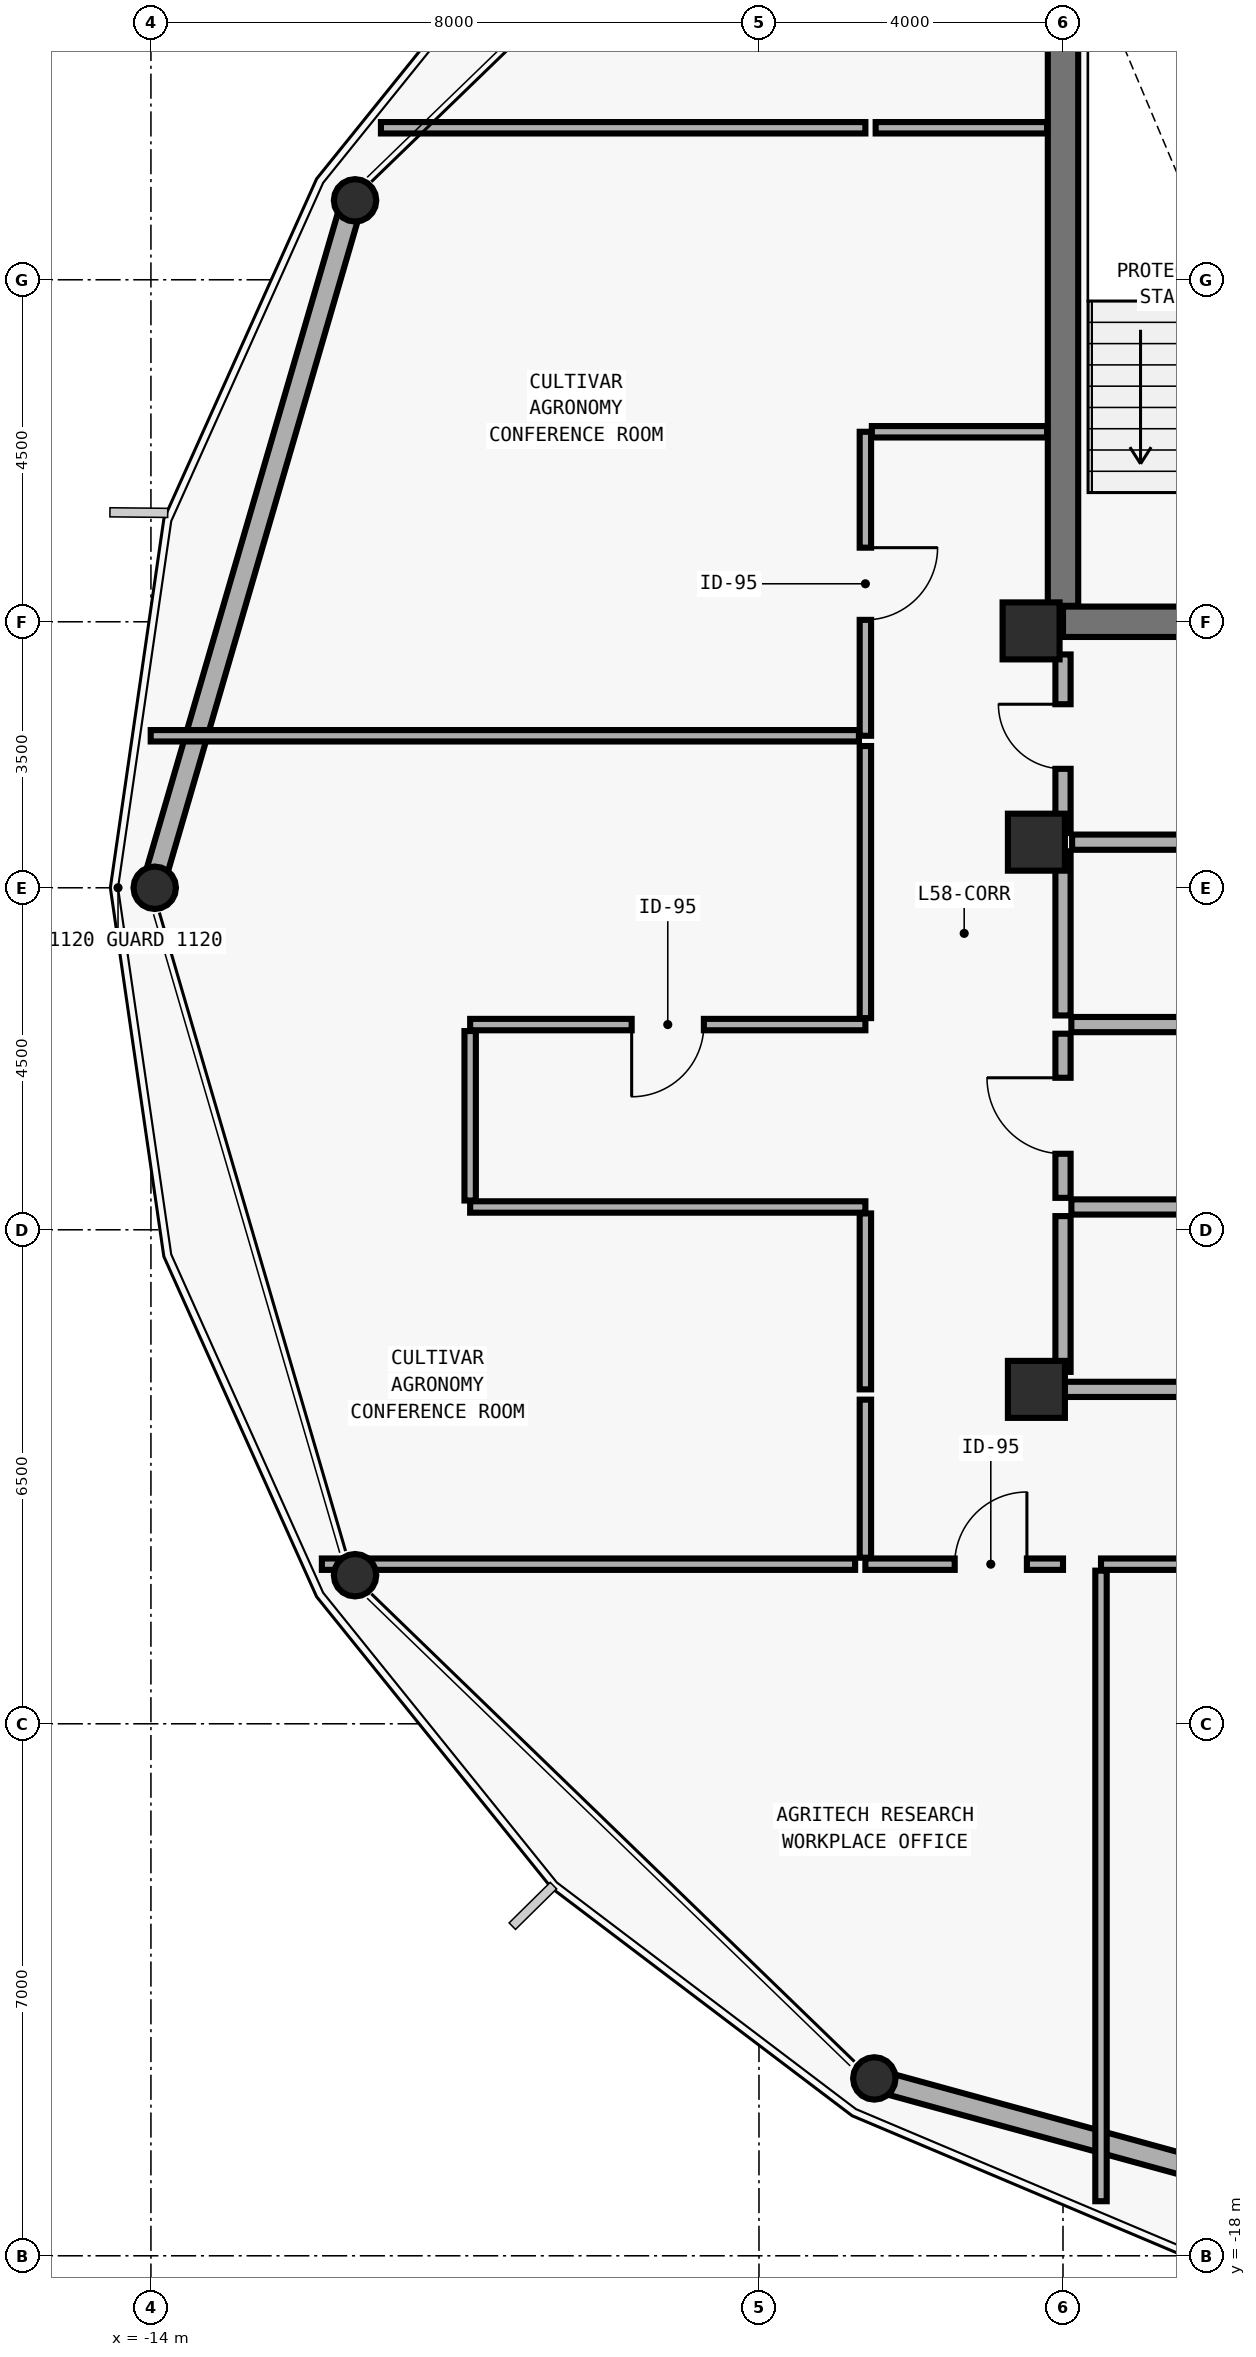
"""IFC4 building model, lengths in metres.
Left out: names, types, materials, properties, quantities, classifications, styles, units other than length and angle.
Written with IfcOpenShell. Run it as: python <this file> out.ifc"""

import sys

from ifc_helpers import new_model, si_unit, direction, frame, frame_2d, origin, origin_2d, place, context, subcontext, project, spatial, rectangle, hollow_circle, extrude, element, fill, save


model = new_model("IFC4")
c1 = context("Model", 3, precision=1e-05, world=origin(), true_north=direction((0.0, 1.0)))
c2 = subcontext(c1, "Body", "Model", "MODEL_VIEW")
j1 = project(units=[si_unit("LENGTHUNIT", "METRE"), si_unit("PLANEANGLEUNIT", "RADIAN")], contexts=[c1])
p1 = place(None, origin())
s1 = spatial("IfcSite", under=j1, at=p1, CompositionType="ELEMENT")
p2 = place(p1, origin())
s2 = spatial("IfcBuilding", under=s1, at=p2, CompositionType="ELEMENT")
p3 = place(p2, frame((0.0, 0.0, 229.2)))
s3 = spatial("IfcBuildingStorey", under=s2, at=p3, CompositionType="ELEMENT", Elevation=229.2)
p4 = place(p3, frame((-2.0, 3.5, 0.0), z_axis=(0.0, 0.0, 1.0), x_axis=(1.0, 0.0, 0.0)))
e1 = element("IfcWall", 1, at=p4, inside=s3, PredefinedType="SHEAR", context=c2, shape_type="SweptSolid", body=[
    extrude(rectangle(XDim=10.0, YDim=0.4, at=frame_2d((5.0, 0.0))), origin(), (0.0, 0.0, 1.0), 3.592),
])
p5 = place(p4, frame((1.65, 0.0, 0.0)))
e2 = element("IfcOpeningElement", 2, at=p5, cuts=e1, PredefinedType="OPENING", context=c2, shape_type="SweptSolid", body=[
    extrude(rectangle(XDim=1.1, YDim=2.15, at=frame_2d((0.55, 1.075))), frame((0.0, 0.21, 0.0), z_axis=(0.0, -1.0, 0.0), x_axis=(1.0, 0.0, 0.0)), (0.0, 0.0, 1.0), 0.42),
])
p6 = place(p4, frame((7.65, 0.0, 0.0)))
e3 = element("IfcOpeningElement", 3, at=p6, cuts=e1, PredefinedType="OPENING", context=c2, shape_type="SweptSolid", body=[
    extrude(rectangle(XDim=1.1, YDim=2.15, at=frame_2d((0.55, 1.075))), frame((0.0, 0.21, 0.0), z_axis=(0.0, -1.0, 0.0), x_axis=(1.0, 0.0, 0.0)), (0.0, 0.0, 1.0), 0.42),
])
p7 = place(p4, frame((3.72, 0.0, 0.0)))
e4 = element("IfcOpeningElement", 4, at=p7, cuts=e1, PredefinedType="OPENING", context=c2, shape_type="SweptSolid", body=[
    extrude(rectangle(XDim=1.1, YDim=2.2, at=frame_2d((0.55, 1.1))), frame((0.0, 0.21, 0.0), z_axis=(0.0, -1.0, 0.0), x_axis=(1.0, 0.0, 0.0)), (0.0, 0.0, 1.0), 0.42),
])
p8 = place(p4, frame((5.18, 0.0, 0.0)))
e5 = element("IfcOpeningElement", 5, at=p8, cuts=e1, PredefinedType="OPENING", context=c2, shape_type="SweptSolid", body=[
    extrude(rectangle(XDim=1.1, YDim=2.2, at=frame_2d((0.55, 1.1))), frame((0.0, 0.21, 0.0), z_axis=(0.0, -1.0, 0.0), x_axis=(1.0, 0.0, 0.0)), (0.0, 0.0, 1.0), 0.42),
])
p9 = place(p3, frame((-2.0, 3.71, 0.0), z_axis=(0.0, 0.0, 1.0), x_axis=(0.0, 1.0, 0.0)))
e6 = element("IfcWall", 6, at=p9, inside=s3, PredefinedType="SHEAR", context=c2, shape_type="SweptSolid", body=[
    extrude(rectangle(XDim=8.58, YDim=0.4, at=frame_2d((4.29, 0.0))), origin(), (0.0, 0.0, 1.0), 3.592),
])
for number, where, z_axis, x_axis in (
    (7, (-2.42, 3.38, 0.0), (0.0, 0.0, 1.0), (1.0, 0.0, 0.0)),
    (8, (-2.35, 0.6, 0.0), (0.0, 0.0, 1.0), (1.0, 0.0, 0.0)),
    (9, (-2.35, -6.6, 0.0), (0.0, 0.0, 1.0), (1.0, 0.0, 0.0)),
):
    element("IfcColumn", number, at=place(p3, frame(where, z_axis=z_axis, x_axis=x_axis)), inside=s3, PredefinedType="COLUMN", context=c2, shape_type="SweptSolid", body=[
        extrude(rectangle(XDim=0.75, YDim=0.75, at=origin_2d()), origin(), (0.0, 0.0, 1.0), 3.575),
    ])
p10 = place(p3, frame((-11.344, 9.053, 0.0), z_axis=(0.016455964715, -0.004711458777, 0.999853490958), x_axis=(0.275247949014, 0.961373271193, 0.0)))
e10 = element("IfcColumn", 10, at=p10, inside=s3, PredefinedType="COLUMN", context=c2, shape_type="SweptSolid", body=[
    extrude(hollow_circle(Radius=0.28, WallThickness=0.02, at=origin_2d()), origin(), (0.0, 0.0, 1.0), 3.575),
])
p11 = place(p3, frame((-13.984, 0.0, 0.0), z_axis=(0.018981760075, 0.0, 0.999819830162), x_axis=(0.0, 1.0, 0.0)))
e11 = element("IfcColumn", 11, at=p11, inside=s3, PredefinedType="COLUMN", context=c2, shape_type="SweptSolid", body=[
    extrude(hollow_circle(Radius=0.28, WallThickness=0.02, at=origin_2d()), origin(), (0.0, 0.0, 1.0), 3.576),
])
p12 = place(p3, frame((-11.344, -9.053, 0.0), z_axis=(0.016455964715, 0.004711458777, 0.999853490958), x_axis=(-0.275247949014, 0.961373271193, 0.0)))
e12 = element("IfcColumn", 12, at=p12, inside=s3, PredefinedType="COLUMN", context=c2, shape_type="SweptSolid", body=[
    extrude(hollow_circle(Radius=0.28, WallThickness=0.02, at=origin_2d()), origin(), (0.0, 0.0, 1.0), 3.575),
])
p13 = place(p3, frame((-4.5, -15.681, 0.0), z_axis=(0.00949183863, 0.008262679671, 0.999920813427), x_axis=(-0.656581650754, 0.754254954172, 0.0)))
e13 = element("IfcColumn", 13, at=p13, inside=s3, PredefinedType="COLUMN", context=c2, shape_type="SweptSolid", body=[
    extrude(hollow_circle(Radius=0.28, WallThickness=0.02, at=origin_2d()), origin(), (0.0, 0.0, 1.0), 3.575),
])
p14 = place(p3, frame((-13.918, 0.225, 0.0), z_axis=(0.0, 0.0, 1.0), x_axis=(0.279948739232, 0.960014949572, 0.0)))
e14 = element("IfcWall", 14, at=p14, inside=s3, PredefinedType="SOLIDWALL", context=c2, shape_type="SweptSolid", body=[
    extrude(rectangle(XDim=8.962, YDim=0.28, at=frame_2d((4.481, 0.0))), origin(), (0.0, 0.0, 1.0), 2.97),
])
p15 = place(p3, frame((4.624, -18.18, 0.0), z_axis=(0.0, 0.0, 1.0), x_axis=(-0.964465770227, 0.264207831189, 0.0)))
e15 = element("IfcWall", 15, at=p15, inside=s3, PredefinedType="SOLIDWALL", context=c2, shape_type="SweptSolid", body=[
    extrude(rectangle(XDim=9.225, YDim=0.28, at=frame_2d((4.612, 0.0))), origin(), (0.0, 0.0, 1.0), 2.97),
])
p16 = place(p3, frame((-2.0, 0.72, 0.0), z_axis=(0.0, 0.0, 1.0), x_axis=(0.0, 1.0, 0.0)))
e16 = element("IfcWall", 16, at=p16, inside=s3, PredefinedType="MOVABLE", context=c2, shape_type="SweptSolid", body=[
    extrude(rectangle(XDim=2.35, YDim=0.2, at=frame_2d((1.175, 0.0))), origin(), (0.0, 0.0, 1.0), 2.692),
])
p17 = place(p16, frame((0.845, 0.0, 0.0)))
e17 = element("IfcOpeningElement", 17, at=p17, cuts=e16, PredefinedType="OPENING", context=c2, shape_type="SweptSolid", body=[
    extrude(rectangle(XDim=0.85, YDim=2.1, at=frame_2d((0.425, 1.05))), frame((0.0, 0.11, 0.0), z_axis=(0.0, -1.0, 0.0), x_axis=(1.0, 0.0, 0.0)), (0.0, 0.0, 1.0), 0.22),
])
p18 = place(p3, frame((-2.0, -4.08, 0.0), z_axis=(0.0, 0.0, 1.0), x_axis=(0.0, 1.0, 0.0)))
e18 = element("IfcWall", 18, at=p18, inside=s3, PredefinedType="MOVABLE", context=c2, shape_type="SweptSolid", body=[
    extrude(rectangle(XDim=2.16, YDim=0.2, at=frame_2d((1.08, 0.0))), origin(), (0.0, 0.0, 1.0), 3.072),
])
p19 = place(p18, frame((0.58, 0.0, 0.0)))
e19 = element("IfcOpeningElement", 19, at=p19, cuts=e18, PredefinedType="OPENING", context=c2, shape_type="SweptSolid", body=[
    extrude(rectangle(XDim=1.0, YDim=2.1, at=frame_2d((0.5, 1.05))), frame((0.0, 0.11, 0.0), z_axis=(0.0, -1.0, 0.0), x_axis=(1.0, 0.0, 0.0)), (0.0, 0.0, 1.0), 0.22),
])
p20 = place(p3, frame((-1.89, -1.8, 0.0), z_axis=(0.0, 0.0, 1.0), x_axis=(1.0, 0.0, 0.0)))
e20 = element("IfcWall", 20, at=p20, inside=s3, PredefinedType="MOVABLE", context=c2, shape_type="SweptSolid", body=[
    extrude(rectangle(XDim=5.73, YDim=0.2, at=frame_2d((2.865, 0.0))), origin(), (0.0, 0.0, 1.0), 3.36),
])
p21 = place(p20, frame((2.29, 0.0, 0.0)))
e21 = element("IfcOpeningElement", 21, at=p21, cuts=e20, PredefinedType="OPENING", context=c2, shape_type="SweptSolid", body=[
    extrude(rectangle(XDim=1.0, YDim=2.1, at=frame_2d((0.5, 1.05))), frame((0.0, 0.11, 0.0), z_axis=(0.0, -1.0, 0.0), x_axis=(1.0, 0.0, 0.0)), (0.0, 0.0, 1.0), 0.22),
])
p22 = place(p3, frame((-1.89, -4.2, 0.0), z_axis=(0.0, 0.0, 1.0), x_axis=(1.0, 0.0, 0.0)))
e22 = element("IfcWall", 22, at=p22, inside=s3, PredefinedType="MOVABLE", context=c2, shape_type="SweptSolid", body=[
    extrude(rectangle(XDim=5.73, YDim=0.2, at=frame_2d((2.865, 0.0))), origin(), (0.0, 0.0, 1.0), 3.36),
])
p23 = place(p22, frame((2.29, 0.0, 0.0)))
e23 = element("IfcOpeningElement", 23, at=p23, cuts=e22, PredefinedType="OPENING", context=c2, shape_type="SweptSolid", body=[
    extrude(rectangle(XDim=1.0, YDim=2.1, at=frame_2d((0.5, 1.05))), frame((0.0, 0.11, 0.0), z_axis=(0.0, -1.0, 0.0), x_axis=(1.0, 0.0, 0.0)), (0.0, 0.0, 1.0), 0.22),
])
p24 = place(p3, frame((-4.6, -8.9, 0.0), z_axis=(0.0, 0.0, 1.0), x_axis=(1.0, 0.0, 0.0)))
e24 = element("IfcWall", 24, at=p24, inside=s3, PredefinedType="PARTITIONING", context=c2, shape_type="SweptSolid", body=[
    extrude(rectangle(XDim=2.6, YDim=0.15, at=frame_2d((1.3, 0.0))), origin(), (0.0, 0.0, 1.0), 3.36),
])
p25 = place(p24, frame((1.175, 0.0, 0.0)))
e25 = element("IfcOpeningElement", 25, at=p25, cuts=e24, PredefinedType="OPENING", context=c2, shape_type="SweptSolid", body=[
    extrude(rectangle(XDim=0.95, YDim=2.1, at=frame_2d((0.475, 1.05))), frame((0.0, 0.085, 0.0), z_axis=(0.0, -1.0, 0.0), x_axis=(1.0, 0.0, 0.0)), (0.0, 0.0, 1.0), 0.17),
])
p26 = place(p3, frame((-1.5, -8.9, 0.0), z_axis=(0.0, 0.0, 1.0), x_axis=(1.0, 0.0, 0.0)))
e26 = element("IfcWall", 26, at=p26, inside=s3, PredefinedType="PARTITIONING", context=c2, shape_type="SweptSolid", body=[
    extrude(rectangle(XDim=8.0, YDim=0.15, at=frame_2d((4.0, 0.0))), origin(), (0.0, 0.0, 1.0), 3.36),
])
p27 = place(p26, frame((3.525, 0.0, 0.0)))
e27 = element("IfcOpeningElement", 27, at=p27, cuts=e26, PredefinedType="OPENING", context=c2, shape_type="SweptSolid", body=[
    extrude(rectangle(XDim=0.95, YDim=2.1, at=frame_2d((0.475, 1.05))), frame((0.0, 0.085, 0.0), z_axis=(0.0, -1.0, 0.0), x_axis=(1.0, 0.0, 0.0)), (0.0, 0.0, 1.0), 0.17),
])
p28 = place(p3, frame((-4.6, -1.8, 0.0), z_axis=(0.0, 0.0, 1.0), x_axis=(-1.0, 0.0, 0.0)))
e28 = element("IfcWall", 28, at=p28, inside=s3, PredefinedType="PARTITIONING", context=c2, shape_type="SweptSolid", body=[
    extrude(rectangle(XDim=5.2, YDim=0.15, at=frame_2d((2.6, 0.0))), origin(), (0.0, 0.0, 1.0), 3.36),
])
p29 = place(p28, frame((2.125, 0.0, 0.0)))
e29 = element("IfcOpeningElement", 29, at=p29, cuts=e28, PredefinedType="OPENING", context=c2, shape_type="SweptSolid", body=[
    extrude(rectangle(XDim=0.95, YDim=2.1, at=frame_2d((0.475, 1.05))), frame((0.0, 0.085, 0.0), z_axis=(0.0, -1.0, 0.0), x_axis=(1.0, 0.0, 0.0)), (0.0, 0.0, 1.0), 0.17),
])
p30 = place(p3, frame((-4.6, 6.0, 0.0), z_axis=(0.0, 0.0, 1.0), x_axis=(0.0, -1.0, 0.0)))
e30 = element("IfcWall", 30, at=p30, inside=s3, PredefinedType="PARTITIONING", context=c2, shape_type="SweptSolid", body=[
    extrude(rectangle(XDim=4.0, YDim=0.15, at=frame_2d((2.0, 0.0))), origin(), (0.0, 0.0, 1.0), 3.36),
])
p31 = place(p30, frame((1.525, 0.0, 0.0)))
e31 = element("IfcOpeningElement", 31, at=p31, cuts=e30, PredefinedType="OPENING", context=c2, shape_type="SweptSolid", body=[
    extrude(rectangle(XDim=0.95, YDim=2.1, at=frame_2d((0.475, 1.05))), frame((0.0, 0.085, 0.0), z_axis=(0.0, -1.0, 0.0), x_axis=(1.0, 0.0, 0.0)), (0.0, 0.0, 1.0), 0.17),
])
p32 = place(p3, frame((-1.88, 0.6, 0.0), z_axis=(0.0, 0.0, 1.0), x_axis=(1.0, 0.0, 0.0)))
e32 = element("IfcWall", 32, at=p32, inside=s3, PredefinedType="MOVABLE", context=c2, shape_type="SweptSolid", body=[
    extrude(rectangle(XDim=5.72, YDim=0.2, at=frame_2d((2.86, 0.0))), origin(), (0.0, 0.0, 1.0), 3.072),
])
p33 = place(p3, frame((-2.0, -1.68, 0.0), z_axis=(0.0, 0.0, 1.0), x_axis=(0.0, 1.0, 0.0)))
e33 = element("IfcWall", 33, at=p33, inside=s3, PredefinedType="MOVABLE", context=c2, shape_type="SweptSolid", body=[
    extrude(rectangle(XDim=2.16, YDim=0.2, at=frame_2d((1.08, 0.0))), origin(), (0.0, 0.0, 1.0), 3.072),
])
p34 = place(p3, frame((-2.0, -6.6, 0.0), z_axis=(0.0, 0.0, 1.0), x_axis=(1.0, 0.0, 0.0)))
e34 = element("IfcWall", 34, at=p34, inside=s3, PredefinedType="MOVABLE", context=c2, shape_type="SweptSolid", body=[
    extrude(rectangle(XDim=5.84, YDim=0.2, at=frame_2d((2.92, 0.0))), origin(), (0.0, 0.0, 1.0), 3.072),
])
p35 = place(p3, frame((-2.0, -6.37, 0.0), z_axis=(0.0, 0.0, 1.0), x_axis=(0.0, 1.0, 0.0)))
e35 = element("IfcWall", 35, at=p35, inside=s3, PredefinedType="MOVABLE", context=c2, shape_type="SweptSolid", body=[
    extrude(rectangle(XDim=2.05, YDim=0.2, at=frame_2d((1.025, 0.0))), origin(), (0.0, 0.0, 1.0), 3.072),
])
p36 = place(p3, frame((-1.5, -8.985, 0.0), z_axis=(0.0, 0.0, 1.0), x_axis=(0.0, -1.0, 0.0)))
e36 = element("IfcWall", 36, at=p36, inside=s3, PredefinedType="PARTITIONING", context=c2, shape_type="SweptSolid", body=[
    extrude(rectangle(XDim=8.297, YDim=0.15, at=frame_2d((4.148, 0.0))), origin(), (0.0, 0.0, 1.0), 3.36),
])
p37 = place(p3, frame((-11.751, -8.9, 0.0), z_axis=(0.0, 0.0, 1.0), x_axis=(1.0, 0.0, 0.0)))
e37 = element("IfcWall", 37, at=p37, inside=s3, PredefinedType="PARTITIONING", context=c2, shape_type="SweptSolid", body=[
    extrude(rectangle(XDim=7.016, YDim=0.15, at=frame_2d((3.508, 0.0))), origin(), (0.0, 0.0, 1.0), 2.892),
])
p38 = place(p3, frame((-9.8, -4.2, 0.0), z_axis=(0.0, 0.0, 1.0), x_axis=(1.0, 0.0, 0.0)))
e38 = element("IfcWall", 38, at=p38, inside=s3, PredefinedType="PARTITIONING", context=c2, shape_type="SweptSolid", body=[
    extrude(rectangle(XDim=5.2, YDim=0.15, at=frame_2d((2.6, 0.0))), origin(), (0.0, 0.0, 1.0), 3.36),
])
p39 = place(p3, frame((-4.6, 1.865, 0.0), z_axis=(0.0, 0.0, 1.0), x_axis=(0.0, -1.0, 0.0)))
e39 = element("IfcWall", 39, at=p39, inside=s3, PredefinedType="PARTITIONING", context=c2, shape_type="SweptSolid", body=[
    extrude(rectangle(XDim=3.58, YDim=0.15, at=frame_2d((1.79, 0.0))), origin(), (0.0, 0.0, 1.0), 3.36),
])
p40 = place(p3, frame((-9.8, -1.885, 0.0), z_axis=(0.0, 0.0, 1.0), x_axis=(0.0, -1.0, 0.0)))
e40 = element("IfcWall", 40, at=p40, inside=s3, PredefinedType="PARTITIONING", context=c2, shape_type="SweptSolid", body=[
    extrude(rectangle(XDim=2.23, YDim=0.15, at=frame_2d((1.115, 0.0))), origin(), (0.0, 0.0, 1.0), 3.36),
])
p41 = place(p3, frame((-4.6, -4.285, 0.0), z_axis=(0.0, 0.0, 1.0), x_axis=(0.0, -1.0, 0.0)))
e41 = element("IfcWall", 41, at=p41, inside=s3, PredefinedType="PARTITIONING", context=c2, shape_type="SweptSolid", body=[
    extrude(rectangle(XDim=2.315, YDim=0.15, at=frame_2d((1.158, 0.0))), origin(), (0.0, 0.0, 1.0), 3.36),
])
p42 = place(p3, frame((-4.6, -6.735, 0.0), z_axis=(0.0, 0.0, 1.0), x_axis=(0.0, -1.0, 0.0)))
e42 = element("IfcWall", 42, at=p42, inside=s3, PredefinedType="PARTITIONING", context=c2, shape_type="SweptSolid", body=[
    extrude(rectangle(XDim=2.08, YDim=0.15, at=frame_2d((1.04, 0.0))), origin(), (0.0, 0.0, 1.0), 3.36),
])
p43 = place(p3, frame((-14.003, 2.0, 0.0), z_axis=(0.0, 0.0, 1.0), x_axis=(1.0, 0.0, 0.0)))
e43 = element("IfcWall", 43, at=p43, inside=s3, PredefinedType="PARTITIONING", context=c2, shape_type="SweptSolid", body=[
    extrude(rectangle(XDim=9.318, YDim=0.15, at=frame_2d((4.659, 0.0))), origin(), (0.0, 0.0, 1.0), 3.36),
])
p44 = place(p3, frame((-2.21, 6.0, 0.0), z_axis=(0.0, 0.0, 1.0), x_axis=(-1.0, 0.0, 0.0)))
e44 = element("IfcWall", 44, at=p44, inside=s3, PredefinedType="PARTITIONING", context=c2, shape_type="SweptSolid", body=[
    extrude(rectangle(XDim=2.305, YDim=0.15, at=frame_2d((1.152, 0.0))), origin(), (0.0, 0.0, 1.0), 3.36),
])
p45 = place(p3, frame((-10.974, 10.0, 0.0), z_axis=(0.0, 0.0, 1.0), x_axis=(1.0, 0.0, 0.0)))
e45 = element("IfcWall", 45, at=p45, inside=s3, PredefinedType="PARTITIONING", context=c2, shape_type="SweptSolid", body=[
    extrude(rectangle(XDim=6.374, YDim=0.15, at=frame_2d((3.187, 0.0))), origin(), (0.0, 0.0, 1.0), 3.36),
])
p46 = place(p3, frame((-4.465, 10.0, 0.0), z_axis=(0.0, 0.0, 1.0), x_axis=(1.0, 0.0, 0.0)))
e46 = element("IfcWall", 46, at=p46, inside=s3, PredefinedType="PARTITIONING", context=c2, shape_type="SweptSolid", body=[
    extrude(rectangle(XDim=2.255, YDim=0.15, at=frame_2d((1.127, 0.0))), origin(), (0.0, 0.0, 1.0), 3.36),
])
p47 = place(p17, origin())
e47 = element("IfcDoor", 47, at=p47, inside=s3, OperationType="SINGLE_SWING_RIGHT", PredefinedType="DOOR", context=c2, shape_type="SweptSolid", body=[
    extrude(rectangle(XDim=0.85, YDim=2.1, at=frame_2d((0.425, 1.05))), frame((0.0, 0.025, 0.0), z_axis=(0.0, -1.0, 0.0), x_axis=(1.0, 0.0, 0.0)), (0.0, 0.0, 1.0), 0.05),
])
fill(e17, e47)
p48 = place(p19, origin())
e48 = element("IfcDoor", 48, at=p48, inside=s3, OperationType="SINGLE_SWING_RIGHT", PredefinedType="DOOR", context=c2, shape_type="SweptSolid", body=[
    extrude(rectangle(XDim=1.0, YDim=2.1, at=frame_2d((0.5, 1.05))), frame((0.0, 0.025, 0.0), z_axis=(0.0, -1.0, 0.0), x_axis=(1.0, 0.0, 0.0)), (0.0, 0.0, 1.0), 0.05),
])
fill(e19, e48)
p49 = place(p25, origin())
e49 = element("IfcDoor", 49, at=p49, inside=s3, OperationType="SINGLE_SWING_RIGHT", PredefinedType="DOOR", context=c2, shape_type="SweptSolid", body=[
    extrude(rectangle(XDim=0.95, YDim=2.1, at=frame_2d((0.475, 1.05))), frame((0.0, 0.025, 0.0), z_axis=(0.0, -1.0, 0.0), x_axis=(1.0, 0.0, 0.0)), (0.0, 0.0, 1.0), 0.05),
])
fill(e25, e49)
p50 = place(p29, origin())
e50 = element("IfcDoor", 50, at=p50, inside=s3, OperationType="SINGLE_SWING_RIGHT", PredefinedType="DOOR", context=c2, shape_type="SweptSolid", body=[
    extrude(rectangle(XDim=0.95, YDim=2.1, at=frame_2d((0.475, 1.05))), frame((0.0, 0.025, 0.0), z_axis=(0.0, -1.0, 0.0), x_axis=(1.0, 0.0, 0.0)), (0.0, 0.0, 1.0), 0.05),
])
fill(e29, e50)
p51 = place(p31, origin())
e51 = element("IfcDoor", 51, at=p51, inside=s3, OperationType="SINGLE_SWING_LEFT", PredefinedType="DOOR", context=c2, shape_type="SweptSolid", body=[
    extrude(rectangle(XDim=0.95, YDim=2.1, at=frame_2d((0.475, 1.05))), frame((0.0, 0.025, 0.0), z_axis=(0.0, -1.0, 0.0), x_axis=(1.0, 0.0, 0.0)), (0.0, 0.0, 1.0), 0.05),
])
fill(e31, e51)
save(model, sys.argv[1])
